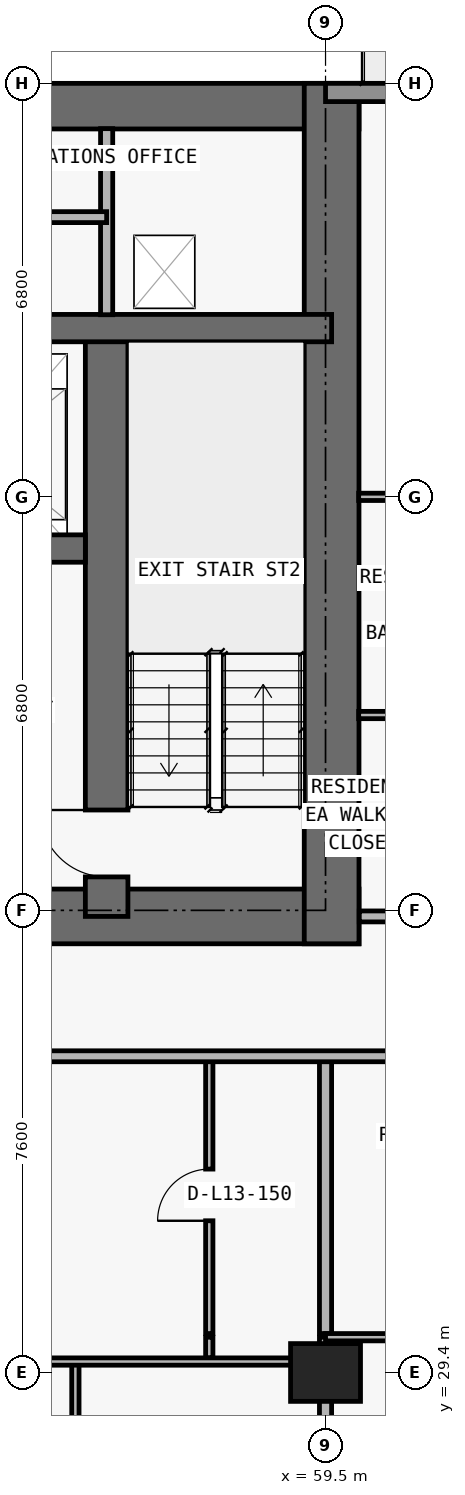
"""IFC4 building model, lengths in metres.
Left out: names, types, materials, properties, quantities, classifications, styles, units other than length and angle.
Written with IfcOpenShell. Run it as: python <this file> out.ifc"""

import sys

from ifc_helpers import new_model, si_unit, direction, frame, frame_2d, origin, origin_2d, place, context, subcontext, project, spatial, rectangle, extrude, element, fill, save


model = new_model("IFC4")
c1 = context("Model", 3, precision=1e-05, world=origin(), true_north=direction((0.0, 1.0)))
c2 = subcontext(c1, "Body", "Model", "MODEL_VIEW")
j1 = project(units=[si_unit("LENGTHUNIT", "METRE"), si_unit("PLANEANGLEUNIT", "RADIAN")], contexts=[c1])
p1 = place(None, origin())
s1 = spatial("IfcSite", under=j1, at=p1, CompositionType="ELEMENT")
p2 = place(p1, origin())
s2 = spatial("IfcBuilding", under=s1, at=p2, CompositionType="ELEMENT")
p3 = place(p2, frame((0.0, 0.0, 53.1)))
s3 = spatial("IfcBuildingStorey", under=s2, at=p3, CompositionType="ELEMENT", Elevation=53.1)
p4 = place(p3, frame((59.5, 29.4, 0.0), z_axis=(0.0, 0.0, 1.0), x_axis=(1.0, 0.0, 0.0)))
e1 = element("IfcColumn", 1, at=p4, inside=s3, PredefinedType="COLUMN", context=c2, shape_type="SweptSolid", body=[
    extrude(rectangle(XDim=1.15, YDim=0.95, at=origin_2d()), origin(), (0.0, 0.0, 1.0), 3.05),
])
p5 = place(p3, frame((17.75, 36.9, 0.0), z_axis=(0.0, 0.0, 1.0), x_axis=(1.0, 0.0, 0.0)))
e2 = element("IfcWall", 2, at=p5, inside=s3, PredefinedType="SHEAR", context=c2, shape_type="SweptSolid", body=[
    extrude(rectangle(XDim=42.3, YDim=0.9, at=frame_2d((21.15, 0.0))), origin(), (0.0, 0.0, 1.0), 3.05),
])
p6 = place(p5, frame((14.55, 0.0, 0.0)))
e3 = element("IfcOpeningElement", 3, at=p6, cuts=e2, PredefinedType="OPENING", context=c2, shape_type="SweptSolid", body=[
    extrude(rectangle(XDim=1.1, YDim=2.15, at=frame_2d((0.55, 1.075))), frame((0.0, 0.46, 0.0), z_axis=(0.0, -1.0, 0.0), x_axis=(1.0, 0.0, 0.0)), (0.0, 0.0, 1.0), 0.92),
])
p7 = place(p5, frame((6.4, 0.0, 0.0)))
e4 = element("IfcOpeningElement", 4, at=p7, cuts=e2, PredefinedType="OPENING", context=c2, shape_type="SweptSolid", body=[
    extrude(rectangle(XDim=1.05, YDim=2.15, at=frame_2d((0.525, 1.075))), frame((0.0, 0.46, 0.0), z_axis=(0.0, -1.0, 0.0), x_axis=(1.0, 0.0, 0.0)), (0.0, 0.0, 1.0), 0.92),
])
p8 = place(p5, frame((34.9, 0.0, 0.0)))
e5 = element("IfcOpeningElement", 5, at=p8, cuts=e2, PredefinedType="OPENING", context=c2, shape_type="SweptSolid", body=[
    extrude(rectangle(XDim=1.05, YDim=2.15, at=frame_2d((0.525, 1.075))), frame((0.0, 0.46, 0.0), z_axis=(0.0, -1.0, 0.0), x_axis=(1.0, 0.0, 0.0)), (0.0, 0.0, 1.0), 0.92),
])
p9 = place(p5, frame((11.012, 0.0, 0.0)))
e6 = element("IfcOpeningElement", 6, at=p9, cuts=e2, PredefinedType="OPENING", context=c2, shape_type="SweptSolid", body=[
    extrude(rectangle(XDim=1.05, YDim=2.15, at=frame_2d((0.525, 1.075))), frame((0.0, 0.46, 0.0), z_axis=(0.0, -1.0, 0.0), x_axis=(1.0, 0.0, 0.0)), (0.0, 0.0, 1.0), 0.92),
])
p10 = place(p5, frame((24.25, 0.0, 0.0)))
e7 = element("IfcOpeningElement", 7, at=p10, cuts=e2, PredefinedType="OPENING", context=c2, shape_type="SweptSolid", body=[
    extrude(rectangle(XDim=1.05, YDim=2.15, at=frame_2d((0.525, 1.075))), frame((0.0, 0.46, 0.0), z_axis=(0.0, -1.0, 0.0), x_axis=(1.0, 0.0, 0.0)), (0.0, 0.0, 1.0), 0.92),
])
p11 = place(p3, frame((17.75, 50.225, 0.0), z_axis=(0.0, 0.0, 1.0), x_axis=(1.0, 0.0, 0.0)))
e8 = element("IfcWall", 8, at=p11, inside=s3, PredefinedType="SHEAR", context=c2, shape_type="SweptSolid", body=[
    extrude(rectangle(XDim=42.3, YDim=0.75, at=frame_2d((21.15, 0.0))), origin(), (0.0, 0.0, 1.0), 3.05),
])
p12 = place(p3, frame((59.6, 36.45, 0.0), z_axis=(0.0, 0.0, 1.0), x_axis=(0.0, 1.0, 0.0)))
e9 = element("IfcWall", 9, at=p12, inside=s3, PredefinedType="SHEAR", context=c2, shape_type="SweptSolid", body=[
    extrude(rectangle(XDim=14.15, YDim=0.9, at=frame_2d((7.075, 0.0))), origin(), (0.0, 0.0, 1.0), 3.05),
])
p13 = place(p3, frame((55.9, 36.9, 0.0), z_axis=(0.0, 0.0, 1.0), x_axis=(0.0, 1.0, 0.0)))
e10 = element("IfcWall", 10, at=p13, inside=s3, PredefinedType="SHEAR", context=c2, shape_type="SweptSolid", body=[
    extrude(rectangle(XDim=9.675, YDim=0.7, at=frame_2d((4.837, 0.0))), origin(), (0.0, 0.0, 1.0), 3.05),
])
p14 = place(p13, frame((0.65, 0.0, 0.0)))
e11 = element("IfcOpeningElement", 11, at=p14, cuts=e10, PredefinedType="OPENING", context=c2, shape_type="SweptSolid", body=[
    extrude(rectangle(XDim=1.1, YDim=2.15, at=frame_2d((0.55, 1.075))), frame((0.0, 0.36, 0.0), z_axis=(0.0, -1.0, 0.0), x_axis=(1.0, 0.0, 0.0)), (0.0, 0.0, 1.0), 0.72),
])
p15 = place(p3, frame((22.25, 42.95, 0.0), z_axis=(0.0, 0.0, 1.0), x_axis=(1.0, 0.0, 0.0)))
e12 = element("IfcWall", 12, at=p15, inside=s3, PredefinedType="SHEAR", context=c2, shape_type="SweptSolid", body=[
    extrude(rectangle(XDim=33.3, YDim=0.45, at=frame_2d((16.65, 0.0))), origin(), (0.0, 0.0, 1.0), 3.05),
])
p16 = place(p15, frame((1.05, 0.0, 0.0)))
e13 = element("IfcOpeningElement", 13, at=p16, cuts=e12, PredefinedType="OPENING", context=c2, shape_type="SweptSolid", body=[
    extrude(rectangle(XDim=1.2, YDim=2.2, at=frame_2d((0.6, 1.1))), frame((0.0, 0.235, 0.0), z_axis=(0.0, -1.0, 0.0), x_axis=(1.0, 0.0, 0.0)), (0.0, 0.0, 1.0), 0.47),
])
p17 = place(p15, frame((31.05, 0.0, 0.0)))
e14 = element("IfcOpeningElement", 14, at=p17, cuts=e12, PredefinedType="OPENING", context=c2, shape_type="SweptSolid", body=[
    extrude(rectangle(XDim=1.2, YDim=2.2, at=frame_2d((0.6, 1.1))), frame((0.0, 0.235, 0.0), z_axis=(0.0, -1.0, 0.0), x_axis=(1.0, 0.0, 0.0)), (0.0, 0.0, 1.0), 0.47),
])
p18 = place(p15, frame((13.5, 0.0, 0.0)))
e15 = element("IfcOpeningElement", 15, at=p18, cuts=e12, PredefinedType="OPENING", context=c2, shape_type="SweptSolid", body=[
    extrude(rectangle(XDim=1.1, YDim=2.2, at=frame_2d((0.55, 1.1))), frame((0.0, 0.235, 0.0), z_axis=(0.0, -1.0, 0.0), x_axis=(1.0, 0.0, 0.0)), (0.0, 0.0, 1.0), 0.47),
])
p19 = place(p15, frame((16.1, 0.0, 0.0)))
e16 = element("IfcOpeningElement", 16, at=p19, cuts=e12, PredefinedType="OPENING", context=c2, shape_type="SweptSolid", body=[
    extrude(rectangle(XDim=1.1, YDim=2.2, at=frame_2d((0.55, 1.1))), frame((0.0, 0.235, 0.0), z_axis=(0.0, -1.0, 0.0), x_axis=(1.0, 0.0, 0.0)), (0.0, 0.0, 1.0), 0.47),
])
p20 = place(p15, frame((18.7, 0.0, 0.0)))
e17 = element("IfcOpeningElement", 17, at=p20, cuts=e12, PredefinedType="OPENING", context=c2, shape_type="SweptSolid", body=[
    extrude(rectangle(XDim=1.1, YDim=2.2, at=frame_2d((0.55, 1.1))), frame((0.0, 0.235, 0.0), z_axis=(0.0, -1.0, 0.0), x_axis=(1.0, 0.0, 0.0)), (0.0, 0.0, 1.0), 0.47),
])
p21 = place(p15, frame((3.625, 0.0, 0.0)))
e18 = element("IfcOpeningElement", 18, at=p21, cuts=e12, PredefinedType="OPENING", context=c2, shape_type="SweptSolid", body=[
    extrude(rectangle(XDim=1.05, YDim=2.15, at=frame_2d((0.525, 1.075))), frame((0.0, 0.235, 0.0), z_axis=(0.0, -1.0, 0.0), x_axis=(1.0, 0.0, 0.0)), (0.0, 0.0, 1.0), 0.47),
])
p22 = place(p15, frame((28.675, 0.0, 0.0)))
e19 = element("IfcOpeningElement", 19, at=p22, cuts=e12, PredefinedType="OPENING", context=c2, shape_type="SweptSolid", body=[
    extrude(rectangle(XDim=1.05, YDim=2.15, at=frame_2d((0.525, 1.075))), frame((0.0, 0.235, 0.0), z_axis=(0.0, -1.0, 0.0), x_axis=(1.0, 0.0, 0.0)), (0.0, 0.0, 1.0), 0.47),
])
p23 = place(p3, frame((18.2, 46.575, 0.0), z_axis=(0.0, 0.0, 1.0), x_axis=(1.0, 0.0, 0.0)))
e20 = element("IfcWall", 20, at=p23, inside=s3, PredefinedType="SHEAR", context=c2, shape_type="SweptSolid", body=[
    extrude(rectangle(XDim=41.4, YDim=0.45, at=frame_2d((20.7, 0.0))), origin(), (0.0, 0.0, 1.0), 3.05),
])
p24 = place(p23, frame((7.675, 0.0, 0.0)))
e21 = element("IfcOpeningElement", 21, at=p24, cuts=e20, PredefinedType="OPENING", context=c2, shape_type="SweptSolid", body=[
    extrude(rectangle(XDim=1.05, YDim=2.15, at=frame_2d((0.525, 1.075))), frame((0.0, 0.235, 0.0), z_axis=(0.0, -1.0, 0.0), x_axis=(1.0, 0.0, 0.0)), (0.0, 0.0, 1.0), 0.47),
])
p25 = place(p23, frame((32.725, 0.0, 0.0)))
e22 = element("IfcOpeningElement", 22, at=p25, cuts=e20, PredefinedType="OPENING", context=c2, shape_type="SweptSolid", body=[
    extrude(rectangle(XDim=1.05, YDim=2.15, at=frame_2d((0.525, 1.075))), frame((0.0, 0.235, 0.0), z_axis=(0.0, -1.0, 0.0), x_axis=(1.0, 0.0, 0.0)), (0.0, 0.0, 1.0), 0.47),
])
p26 = place(p3, frame((59.5, 50.45, 0.0), z_axis=(0.0, 0.0, 1.0), x_axis=(1.0, 0.0, 0.0)))
e23 = element("IfcWall", 23, at=p26, inside=s3, PredefinedType="STANDARD", context=c2, shape_type="SweptSolid", body=[
    extrude(rectangle(XDim=13.2, YDim=0.3, at=frame_2d((6.6, 0.0))), origin(), (0.0, 0.0, 1.0), 3.05),
])
p27 = place(p26, frame((5.6, 0.0, 0.0)))
e24 = element("IfcOpeningElement", 24, at=p27, cuts=e23, PredefinedType="OPENING", context=c2, shape_type="SweptSolid", body=[
    extrude(rectangle(XDim=2.0, YDim=2.3, at=frame_2d((1.0, 1.15))), frame((0.0, 0.16, 0.0), z_axis=(0.0, -1.0, 0.0), x_axis=(1.0, 0.0, 0.0)), (0.0, 0.0, 1.0), 0.32),
])
p28 = place(p3, frame((55.386, 24.89, 0.0), z_axis=(0.0, 0.0, 1.0), x_axis=(0.0, 1.0, 0.0)))
e25 = element("IfcWall", 25, at=p28, inside=s3, PredefinedType="PARTITIONING", context=c2, shape_type="SweptSolid", body=[
    extrude(rectangle(XDim=4.69, YDim=0.12, at=frame_2d((2.345, 0.0))), origin(), (0.0, 0.0, 1.0), 2.423),
])
p29 = place(p28, frame((1.895, 0.0, 0.0)))
e26 = element("IfcOpeningElement", 26, at=p29, cuts=e25, PredefinedType="OPENING", context=c2, shape_type="SweptSolid", body=[
    extrude(rectangle(XDim=0.9, YDim=2.15, at=frame_2d((0.45, 1.075))), frame((0.0, 0.07, 0.0), z_axis=(0.0, -1.0, 0.0), x_axis=(1.0, 0.0, 0.0)), (0.0, 0.0, 1.0), 0.14),
])
p30 = place(p3, frame((55.9, 46.795, 0.0), z_axis=(0.0, 0.0, 1.0), x_axis=(0.0, 1.0, 0.0)))
e27 = element("IfcWall", 27, at=p30, inside=s3, PredefinedType="PARTITIONING", context=c2, shape_type="SweptSolid", body=[
    extrude(rectangle(XDim=3.06, YDim=0.2, at=frame_2d((1.53, 0.0))), origin(), (0.0, 0.0, 1.0), 3.05),
])
p31 = place(p3, frame((57.588, 29.64, 0.0), z_axis=(0.0, 0.0, 1.0), x_axis=(0.0, 1.0, 0.0)))
e28 = element("IfcWall", 28, at=p31, inside=s3, PredefinedType="PARTITIONING", context=c2, shape_type="SweptSolid", body=[
    extrude(rectangle(XDim=0.34, YDim=0.12, at=frame_2d((0.17, 0.0))), origin(), (0.0, 0.0, 1.0), 3.05),
])
p32 = place(p3, frame((57.588, 30.04, 0.0), z_axis=(0.0, 0.0, 1.0), x_axis=(0.0, 1.0, 0.0)))
e29 = element("IfcWall", 29, at=p32, inside=s3, PredefinedType="PARTITIONING", context=c2, shape_type="SweptSolid", body=[
    extrude(rectangle(XDim=4.56, YDim=0.12, at=frame_2d((2.28, 0.0))), origin(), (0.0, 0.0, 1.0), 3.05),
])
p33 = place(p32, frame((1.855, 0.0, 0.0)))
e30 = element("IfcOpeningElement", 30, at=p33, cuts=e29, PredefinedType="OPENING", context=c2, shape_type="SweptSolid", body=[
    extrude(rectangle(XDim=0.85, YDim=2.1, at=frame_2d((0.425, 1.05))), frame((0.0, 0.07, 0.0), z_axis=(0.0, -1.0, 0.0), x_axis=(1.0, 0.0, 0.0)), (0.0, 0.0, 1.0), 0.14),
])
p34 = place(p3, frame((59.5, 24.89, 0.0), z_axis=(0.0, 0.0, 1.0), x_axis=(0.0, 1.0, 0.0)))
e31 = element("IfcWall", 31, at=p34, inside=s3, PredefinedType="PARTITIONING", context=c2, shape_type="SweptSolid", body=[
    extrude(rectangle(XDim=4.69, YDim=0.2, at=frame_2d((2.345, 0.0))), origin(), (0.0, 0.0, 1.0), 2.11),
])
p35 = place(p3, frame((59.5, 29.64, 0.0), z_axis=(0.0, 0.0, 1.0), x_axis=(0.0, 1.0, 0.0)))
e32 = element("IfcWall", 32, at=p35, inside=s3, PredefinedType="PARTITIONING", context=c2, shape_type="SweptSolid", body=[
    extrude(rectangle(XDim=0.34, YDim=0.2, at=frame_2d((0.17, 0.0))), origin(), (0.0, 0.0, 1.0), 2.11),
])
p36 = place(p3, frame((59.5, 30.04, 0.0), z_axis=(0.0, 0.0, 1.0), x_axis=(0.0, 1.0, 0.0)))
e33 = element("IfcWall", 33, at=p36, inside=s3, PredefinedType="PARTITIONING", context=c2, shape_type="SweptSolid", body=[
    extrude(rectangle(XDim=4.56, YDim=0.2, at=frame_2d((2.28, 0.0))), origin(), (0.0, 0.0, 1.0), 2.11),
])
p37 = place(p3, frame((51.1, 29.58, 0.0), z_axis=(0.0, 0.0, 1.0), x_axis=(1.0, 0.0, 0.0)))
e34 = element("IfcWall", 34, at=p37, inside=s3, PredefinedType="PARTITIONING", context=c2, shape_type="SweptSolid", body=[
    extrude(rectangle(XDim=8.4, YDim=0.12, at=frame_2d((4.2, 0.0))), origin(), (0.0, 0.0, 1.0), 2.11),
])
p38 = place(p37, frame((1.693, 0.0, 0.0)))
e35 = element("IfcOpeningElement", 35, at=p38, cuts=e34, PredefinedType="OPENING", context=c2, shape_type="SweptSolid", body=[
    extrude(rectangle(XDim=0.9, YDim=2.06, at=frame_2d((0.45, 1.03))), frame((0.0, 0.07, 0.0), z_axis=(0.0, -1.0, 0.0), x_axis=(1.0, 0.0, 0.0)), (0.0, 0.0, 1.0), 0.14),
])
p39 = place(p3, frame((59.5, 29.98, 0.0), z_axis=(0.0, 0.0, 1.0), x_axis=(1.0, 0.0, 0.0)))
e36 = element("IfcWall", 36, at=p39, inside=s3, PredefinedType="PARTITIONING", context=c2, shape_type="SweptSolid", body=[
    extrude(rectangle(XDim=8.4, YDim=0.12, at=frame_2d((4.2, 0.0))), origin(), (0.0, 0.0, 1.0), 3.05),
])
p40 = place(p39, frame((1.818, 0.0, 0.0)))
e37 = element("IfcOpeningElement", 37, at=p40, cuts=e36, PredefinedType="OPENING", context=c2, shape_type="SweptSolid", body=[
    extrude(rectangle(XDim=0.9, YDim=2.15, at=frame_2d((0.45, 1.075))), frame((0.0, 0.07, 0.0), z_axis=(0.0, -1.0, 0.0), x_axis=(1.0, 0.0, 0.0)), (0.0, 0.0, 1.0), 0.14),
])
p41 = place(p3, frame((5.105, 34.6, 0.0), z_axis=(0.0, 0.0, 1.0), x_axis=(1.0, 0.0, 0.0)))
e38 = element("IfcWall", 38, at=p41, inside=s3, PredefinedType="PARTITIONING", context=c2, shape_type="SweptSolid", body=[
    extrude(rectangle(XDim=67.595, YDim=0.18, at=frame_2d((33.797, 0.0))), origin(), (0.0, 0.0, 1.0), 3.05),
])
p42 = place(p41, frame((7.365, 0.0, 0.0)))
e39 = element("IfcOpeningElement", 39, at=p42, cuts=e38, PredefinedType="OPENING", context=c2, shape_type="SweptSolid", body=[
    extrude(rectangle(XDim=1.0, YDim=2.2, at=frame_2d((0.5, 1.1))), frame((0.0, 0.1, 0.0), z_axis=(0.0, -1.0, 0.0), x_axis=(1.0, 0.0, 0.0)), (0.0, 0.0, 1.0), 0.2),
])
p43 = place(p41, frame((15.927, 0.0, 0.0)))
e40 = element("IfcOpeningElement", 40, at=p43, cuts=e38, PredefinedType="OPENING", context=c2, shape_type="SweptSolid", body=[
    extrude(rectangle(XDim=1.0, YDim=2.2, at=frame_2d((0.5, 1.1))), frame((0.0, 0.1, 0.0), z_axis=(0.0, -1.0, 0.0), x_axis=(1.0, 0.0, 0.0)), (0.0, 0.0, 1.0), 0.2),
])
p44 = place(p41, frame((24.407, 0.0, 0.0)))
e41 = element("IfcOpeningElement", 41, at=p44, cuts=e38, PredefinedType="OPENING", context=c2, shape_type="SweptSolid", body=[
    extrude(rectangle(XDim=1.0, YDim=2.2, at=frame_2d((0.5, 1.1))), frame((0.0, 0.1, 0.0), z_axis=(0.0, -1.0, 0.0), x_axis=(1.0, 0.0, 0.0)), (0.0, 0.0, 1.0), 0.2),
])
p45 = place(p41, frame((48.739, 0.0, 0.0)))
e42 = element("IfcOpeningElement", 42, at=p45, cuts=e38, PredefinedType="OPENING", context=c2, shape_type="SweptSolid", body=[
    extrude(rectangle(XDim=1.0, YDim=2.2, at=frame_2d((0.5, 1.1))), frame((0.0, 0.1, 0.0), z_axis=(0.0, -1.0, 0.0), x_axis=(1.0, 0.0, 0.0)), (0.0, 0.0, 1.0), 0.2),
])
p46 = place(p41, frame((56.98, 0.0, 0.0)))
e43 = element("IfcOpeningElement", 43, at=p46, cuts=e38, PredefinedType="OPENING", context=c2, shape_type="SweptSolid", body=[
    extrude(rectangle(XDim=1.0, YDim=2.2, at=frame_2d((0.5, 1.1))), frame((0.0, 0.1, 0.0), z_axis=(0.0, -1.0, 0.0), x_axis=(1.0, 0.0, 0.0)), (0.0, 0.0, 1.0), 0.2),
])
p47 = place(p3, frame((60.055, 36.9, 0.0), z_axis=(0.0, 0.0, 1.0), x_axis=(1.0, 0.0, 0.0)))
e44 = element("IfcWall", 44, at=p47, inside=s3, PredefinedType="PARTITIONING", context=c2, shape_type="SweptSolid", body=[
    extrude(rectangle(XDim=12.645, YDim=0.18, at=frame_2d((6.323, 0.0))), origin(), (0.0, 0.0, 1.0), 3.05),
])
p48 = place(p47, frame((4.52, 0.0, 0.0)))
e45 = element("IfcOpeningElement", 45, at=p48, cuts=e44, PredefinedType="OPENING", context=c2, shape_type="SweptSolid", body=[
    extrude(rectangle(XDim=1.0, YDim=2.2, at=frame_2d((0.5, 1.1))), frame((0.0, 0.1, 0.0), z_axis=(0.0, -1.0, 0.0), x_axis=(1.0, 0.0, 0.0)), (0.0, 0.0, 1.0), 0.2),
])
p49 = place(p3, frame((60.045, 40.212, 0.0), z_axis=(0.0, 0.0, 1.0), x_axis=(1.0, 0.0, 0.0)))
e46 = element("IfcWall", 46, at=p49, inside=s3, PredefinedType="PARTITIONING", context=c2, shape_type="SweptSolid", body=[
    extrude(rectangle(XDim=2.205, YDim=0.12, at=frame_2d((1.103, 0.0))), origin(), (0.0, 0.0, 1.0), 3.05),
])
p50 = place(p3, frame((60.045, 43.8, 0.0), z_axis=(0.0, 0.0, 1.0), x_axis=(1.0, 0.0, 0.0)))
e47 = element("IfcWall", 47, at=p50, inside=s3, PredefinedType="PARTITIONING", context=c2, shape_type="SweptSolid", body=[
    extrude(rectangle(XDim=15.96, YDim=0.12, at=frame_2d((7.98, 0.0))), origin(), (0.0, 0.0, 1.0), 2.339),
])
p51 = place(p50, frame((9.805, 0.0, 0.0)))
e48 = element("IfcOpeningElement", 48, at=p51, cuts=e47, PredefinedType="OPENING", context=c2, shape_type="SweptSolid", body=[
    extrude(rectangle(XDim=0.9, YDim=2.15, at=frame_2d((0.45, 1.075))), frame((0.0, 0.07, 0.0), z_axis=(0.0, -1.0, 0.0), x_axis=(1.0, 0.0, 0.0)), (0.0, 0.0, 1.0), 0.14),
])
p52 = place(p50, frame((4.58, 0.0, 0.0)))
e49 = element("IfcOpeningElement", 49, at=p52, cuts=e47, PredefinedType="OPENING", context=c2, shape_type="SweptSolid", body=[
    extrude(rectangle(XDim=0.9, YDim=2.15, at=frame_2d((0.45, 1.075))), frame((0.0, 0.07, 0.0), z_axis=(0.0, -1.0, 0.0), x_axis=(1.0, 0.0, 0.0)), (0.0, 0.0, 1.0), 0.14),
])
p53 = place(p50, frame((0.677, 0.0, 0.0)))
e50 = element("IfcOpeningElement", 50, at=p53, cuts=e47, PredefinedType="OPENING", context=c2, shape_type="SweptSolid", body=[
    extrude(rectangle(XDim=0.85, YDim=2.1, at=frame_2d((0.425, 1.05))), frame((0.0, 0.07, 0.0), z_axis=(0.0, -1.0, 0.0), x_axis=(1.0, 0.0, 0.0)), (0.0, 0.0, 1.0), 0.14),
])
p54 = place(p3, frame((21.9, 48.4, 0.0), z_axis=(0.0, 0.0, 1.0), x_axis=(1.0, 0.0, 0.0)))
e51 = element("IfcWall", 51, at=p54, inside=s3, PredefinedType="PARTITIONING", context=c2, shape_type="SweptSolid", body=[
    extrude(rectangle(XDim=34.0, YDim=0.18, at=frame_2d((17.0, 0.0))), origin(), (0.0, 0.0, 1.0), 3.05),
])
p55 = place(p54, frame((8.0, 0.0, 0.0)))
e52 = element("IfcOpeningElement", 52, at=p55, cuts=e51, PredefinedType="OPENING", context=c2, shape_type="SweptSolid", body=[
    extrude(rectangle(XDim=1.0, YDim=2.2, at=frame_2d((0.5, 1.1))), frame((0.0, 0.1, 0.0), z_axis=(0.0, -1.0, 0.0), x_axis=(1.0, 0.0, 0.0)), (0.0, 0.0, 1.0), 0.2),
])
p56 = place(p54, frame((25.0, 0.0, 0.0)))
e53 = element("IfcOpeningElement", 53, at=p56, cuts=e51, PredefinedType="OPENING", context=c2, shape_type="SweptSolid", body=[
    extrude(rectangle(XDim=1.0, YDim=2.2, at=frame_2d((0.5, 1.1))), frame((0.0, 0.1, 0.0), z_axis=(0.0, -1.0, 0.0), x_axis=(1.0, 0.0, 0.0)), (0.0, 0.0, 1.0), 0.2),
])
p57 = place(p14, origin())
e54 = element("IfcDoor", 54, at=p57, inside=s3, OperationType="SINGLE_SWING_RIGHT", PredefinedType="DOOR", context=c2, shape_type="SweptSolid", body=[
    extrude(rectangle(XDim=1.1, YDim=2.15, at=frame_2d((0.55, 1.075))), frame((0.0, 0.025, 0.0), z_axis=(0.0, -1.0, 0.0), x_axis=(1.0, 0.0, 0.0)), (0.0, 0.0, 1.0), 0.05),
])
fill(e11, e54)
p58 = place(p33, origin())
e55 = element("IfcDoor", 55, at=p58, inside=s3, OperationType="SINGLE_SWING_LEFT", PredefinedType="DOOR", context=c2, shape_type="SweptSolid", body=[
    extrude(rectangle(XDim=0.85, YDim=2.1, at=frame_2d((0.425, 1.05))), frame((0.0, 0.025, 0.0), z_axis=(0.0, -1.0, 0.0), x_axis=(1.0, 0.0, 0.0)), (0.0, 0.0, 1.0), 0.05),
])
fill(e30, e55)
save(model, sys.argv[1])
